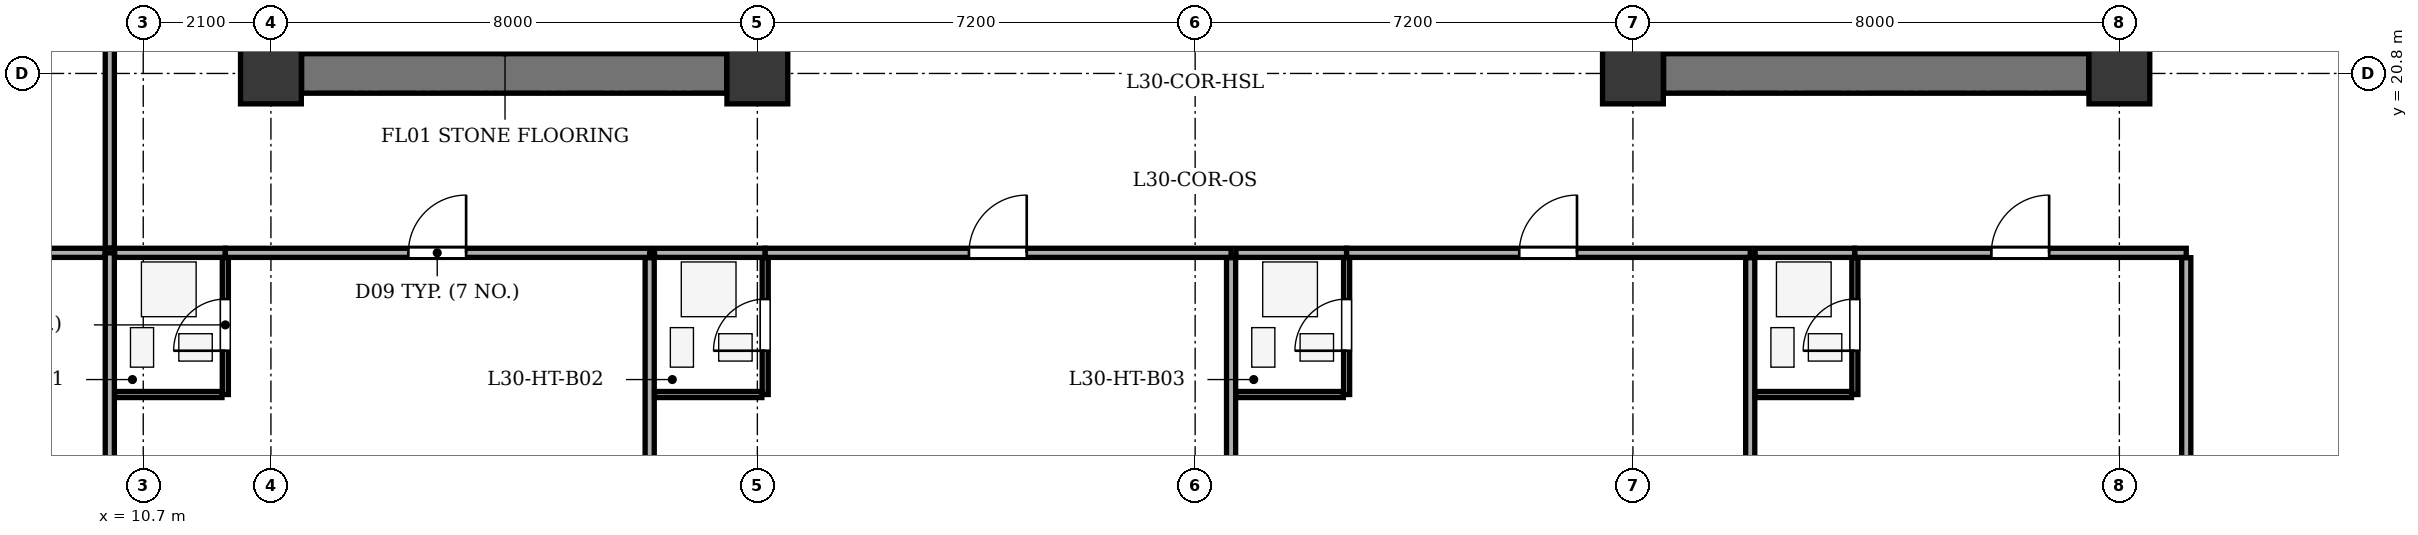
"""IFC4 building model, lengths in metres.
Left out: names, types, materials, properties, quantities, classifications, styles, units other than length and angle.
Written with IfcOpenShell. Run it as: python <this file> out.ifc"""

import sys

from ifc_helpers import new_model, si_unit, direction, frame, frame_2d, origin, origin_2d, place, context, subcontext, project, spatial, rectangle, extrude, element, fill, save


model = new_model("IFC4")
c1 = context("Model", 3, precision=1e-05, world=origin(), true_north=direction((0.0, 1.0)))
c2 = subcontext(c1, "Body", "Model", "MODEL_VIEW")
j1 = project(units=[si_unit("LENGTHUNIT", "METRE"), si_unit("PLANEANGLEUNIT", "RADIAN")], contexts=[c1])
p1 = place(None, origin())
s1 = spatial("IfcSite", under=j1, at=p1, CompositionType="ELEMENT")
p2 = place(p1, origin())
s2 = spatial("IfcBuilding", under=s1, at=p2, CompositionType="ELEMENT")
p3 = place(p2, frame((0.0, 0.0, 123.8)))
s3 = spatial("IfcBuildingStorey", under=s2, at=p3, CompositionType="ELEMENT", Elevation=123.8)
for number, where, z_axis, x_axis in (
    (1, (12.8, 20.8, 0.0), (0.0, 0.0, 1.0), (1.0, 0.0, 0.0)),
    (2, (20.8, 20.8, 0.0), (0.0, 0.0, 1.0), (1.0, 0.0, 0.0)),
    (3, (35.2, 20.8, 0.0), (0.0, 0.0, 1.0), (1.0, 0.0, 0.0)),
    (4, (43.2, 20.8, 0.0), (0.0, 0.0, 1.0), (1.0, 0.0, 0.0)),
):
    element("IfcColumn", number, at=place(p3, frame(where, z_axis=z_axis, x_axis=x_axis)), inside=s3, PredefinedType="COLUMN", context=c2, shape_type="SweptSolid", body=[
        extrude(rectangle(XDim=1.0, YDim=1.0, at=origin_2d()), origin(), (0.0, 0.0, 1.0), 3.5),
    ])
p4 = place(p3, frame((13.305, 20.8, 0.0), z_axis=(0.0, 0.0, 1.0), x_axis=(1.0, 0.0, 0.0)))
e5 = element("IfcWall", 5, at=p4, inside=s3, PredefinedType="SHEAR", context=c2, shape_type="SweptSolid", body=[
    extrude(rectangle(XDim=6.99, YDim=0.65, at=frame_2d((3.495, 0.0))), origin(), (0.0, 0.0, 1.0), 3.2),
])
p5 = place(p3, frame((16.435, 21.135, 0.0), z_axis=(0.0, 0.0, 1.0), x_axis=(0.0, 1.0, 0.0)))
e6 = element("IfcWall", 6, at=p5, inside=s3, PredefinedType="SHEAR", context=c2, shape_type="SweptSolid", body=[
    extrude(rectangle(XDim=12.13, YDim=0.25, at=frame_2d((6.065, 0.0))), origin(), (0.0, 0.0, 1.0), 3.2),
])
p6 = place(p5, frame((0.515, 0.0, 0.0)))
e7 = element("IfcOpeningElement", 7, at=p6, cuts=e6, PredefinedType="OPENING", context=c2, shape_type="SweptSolid", body=[
    extrude(rectangle(XDim=1.2, YDim=2.15, at=frame_2d((0.6, 1.075))), frame((0.0, 0.135, 0.0), z_axis=(0.0, -1.0, 0.0), x_axis=(1.0, 0.0, 0.0)), (0.0, 0.0, 1.0), 0.27),
])
p7 = place(p5, frame((2.665, 0.0, 0.0)))
e8 = element("IfcOpeningElement", 8, at=p7, cuts=e6, PredefinedType="OPENING", context=c2, shape_type="SweptSolid", body=[
    extrude(rectangle(XDim=1.15, YDim=2.15, at=frame_2d((0.575, 1.075))), frame((0.0, 0.135, 0.0), z_axis=(0.0, -1.0, 0.0), x_axis=(1.0, 0.0, 0.0)), (0.0, 0.0, 1.0), 0.27),
])
p8 = place(p3, frame((35.705, 20.8, 0.0), z_axis=(0.0, 0.0, 1.0), x_axis=(1.0, 0.0, 0.0)))
e9 = element("IfcWall", 9, at=p8, inside=s3, PredefinedType="SHEAR", context=c2, shape_type="SweptSolid", body=[
    extrude(rectangle(XDim=6.99, YDim=0.65, at=frame_2d((3.495, 0.0))), origin(), (0.0, 0.0, 1.0), 3.2),
])
p9 = place(p3, frame((39.565, 21.135, 0.0), z_axis=(0.0, 0.0, 1.0), x_axis=(0.0, 1.0, 0.0)))
e10 = element("IfcWall", 10, at=p9, inside=s3, PredefinedType="SHEAR", context=c2, shape_type="SweptSolid", body=[
    extrude(rectangle(XDim=12.13, YDim=0.25, at=frame_2d((6.065, 0.0))), origin(), (0.0, 0.0, 1.0), 3.2),
])
p10 = place(p9, frame((0.515, 0.0, 0.0)))
e11 = element("IfcOpeningElement", 11, at=p10, cuts=e10, PredefinedType="OPENING", context=c2, shape_type="SweptSolid", body=[
    extrude(rectangle(XDim=1.2, YDim=2.15, at=frame_2d((0.6, 1.075))), frame((0.0, 0.135, 0.0), z_axis=(0.0, -1.0, 0.0), x_axis=(1.0, 0.0, 0.0)), (0.0, 0.0, 1.0), 0.27),
])
p11 = place(p9, frame((2.665, 0.0, 0.0)))
e12 = element("IfcOpeningElement", 12, at=p11, cuts=e10, PredefinedType="OPENING", context=c2, shape_type="SweptSolid", body=[
    extrude(rectangle(XDim=1.15, YDim=2.15, at=frame_2d((0.575, 1.075))), frame((0.0, 0.135, 0.0), z_axis=(0.0, -1.0, 0.0), x_axis=(1.0, 0.0, 0.0)), (0.0, 0.0, 1.0), 0.27),
])
p12 = place(p3, frame((10.15, 1.875, 0.0), z_axis=(0.0, 0.0, 1.0), x_axis=(0.0, 1.0, 0.0)))
e13 = element("IfcWall", 13, at=p12, inside=s3, PredefinedType="PARTITIONING", context=c2, shape_type="SweptSolid", body=[
    extrude(rectangle(XDim=15.975, YDim=0.15, at=frame_2d((7.988, 0.0))), origin(), (0.0, 0.0, 1.0), 3.2),
])
p13 = place(p3, frame((10.23, 17.85, 0.0), z_axis=(0.0, 0.0, 1.0), x_axis=(1.0, 0.0, 0.0)))
e14 = element("IfcWall", 14, at=p13, inside=s3, PredefinedType="PARTITIONING", context=c2, shape_type="SweptSolid", body=[
    extrude(rectangle(XDim=1.82, YDim=0.15, at=frame_2d((0.91, 0.0))), origin(), (0.0, 0.0, 1.0), 3.2),
])
p14 = place(p3, frame((12.05, 17.85, 0.0), z_axis=(0.0, 0.0, 1.0), x_axis=(1.0, 0.0, 0.0)))
e15 = element("IfcWall", 15, at=p14, inside=s3, PredefinedType="PARTITIONING", context=c2, shape_type="SweptSolid", body=[
    extrude(rectangle(XDim=6.979, YDim=0.15, at=frame_2d((3.49, 0.0))), origin(), (0.0, 0.0, 1.0), 3.2),
])
p15 = place(p14, frame((3.01, 0.0, 0.0)))
e16 = element("IfcOpeningElement", 16, at=p15, cuts=e15, PredefinedType="OPENING", context=c2, shape_type="SweptSolid", body=[
    extrude(rectangle(XDim=0.95, YDim=2.1, at=frame_2d((0.475, 1.05))), frame((0.0, 0.085, 0.0), z_axis=(0.0, -1.0, 0.0), x_axis=(1.0, 0.0, 0.0)), (0.0, 0.0, 1.0), 0.17),
])
p16 = place(p3, frame((12.05, 15.52, 0.0), z_axis=(0.0, 0.0, 1.0), x_axis=(0.0, 1.0, 0.0)))
e17 = element("IfcWall", 17, at=p16, inside=s3, PredefinedType="PARTITIONING", context=c2, shape_type="SweptSolid", body=[
    extrude(rectangle(XDim=2.25, YDim=0.1, at=frame_2d((1.125, 0.0))), origin(), (0.0, 0.0, 1.0), 3.2),
])
p17 = place(p16, frame((0.72, 0.0, 0.0)))
e18 = element("IfcOpeningElement", 18, at=p17, cuts=e17, PredefinedType="OPENING", context=c2, shape_type="SweptSolid", body=[
    extrude(rectangle(XDim=0.85, YDim=2.05, at=frame_2d((0.425, 1.025))), frame((0.0, 0.06, 0.0), z_axis=(0.0, -1.0, 0.0), x_axis=(1.0, 0.0, 0.0)), (0.0, 0.0, 1.0), 0.12),
])
p18 = place(p3, frame((10.23, 15.52, 0.0), z_axis=(0.0, 0.0, 1.0), x_axis=(1.0, 0.0, 0.0)))
e19 = element("IfcWall", 19, at=p18, inside=s3, PredefinedType="PARTITIONING", context=c2, shape_type="SweptSolid", body=[
    extrude(rectangle(XDim=1.765, YDim=0.1, at=frame_2d((0.883, 0.0))), origin(), (0.0, 0.0, 1.0), 3.2),
])
p19 = place(p3, frame((19.029, 1.875, 0.0), z_axis=(0.0, 0.0, 1.0), x_axis=(0.0, 1.0, 0.0)))
e20 = element("IfcWall", 20, at=p19, inside=s3, PredefinedType="PARTITIONING", context=c2, shape_type="SweptSolid", body=[
    extrude(rectangle(XDim=15.895, YDim=0.15, at=frame_2d((7.948, 0.0))), origin(), (0.0, 0.0, 1.0), 3.2),
])
p20 = place(p3, frame((19.109, 17.85, 0.0), z_axis=(0.0, 0.0, 1.0), x_axis=(1.0, 0.0, 0.0)))
e21 = element("IfcWall", 21, at=p20, inside=s3, PredefinedType="PARTITIONING", context=c2, shape_type="SweptSolid", body=[
    extrude(rectangle(XDim=1.82, YDim=0.15, at=frame_2d((0.91, 0.0))), origin(), (0.0, 0.0, 1.0), 3.2),
])
p21 = place(p3, frame((20.929, 17.85, 0.0), z_axis=(0.0, 0.0, 1.0), x_axis=(1.0, 0.0, 0.0)))
e22 = element("IfcWall", 22, at=p21, inside=s3, PredefinedType="PARTITIONING", context=c2, shape_type="SweptSolid", body=[
    extrude(rectangle(XDim=7.662, YDim=0.15, at=frame_2d((3.831, 0.0))), origin(), (0.0, 0.0, 1.0), 3.2),
])
p22 = place(p21, frame((3.351, 0.0, 0.0)))
e23 = element("IfcOpeningElement", 23, at=p22, cuts=e22, PredefinedType="OPENING", context=c2, shape_type="SweptSolid", body=[
    extrude(rectangle(XDim=0.95, YDim=2.1, at=frame_2d((0.475, 1.05))), frame((0.0, 0.085, 0.0), z_axis=(0.0, -1.0, 0.0), x_axis=(1.0, 0.0, 0.0)), (0.0, 0.0, 1.0), 0.17),
])
p23 = place(p3, frame((20.929, 15.52, 0.0), z_axis=(0.0, 0.0, 1.0), x_axis=(0.0, 1.0, 0.0)))
e24 = element("IfcWall", 24, at=p23, inside=s3, PredefinedType="PARTITIONING", context=c2, shape_type="SweptSolid", body=[
    extrude(rectangle(XDim=2.25, YDim=0.1, at=frame_2d((1.125, 0.0))), origin(), (0.0, 0.0, 1.0), 2.535),
])
p24 = place(p23, frame((0.72, 0.0, 0.0)))
e25 = element("IfcOpeningElement", 25, at=p24, cuts=e24, PredefinedType="OPENING", context=c2, shape_type="SweptSolid", body=[
    extrude(rectangle(XDim=0.85, YDim=2.05, at=frame_2d((0.425, 1.025))), frame((0.0, 0.06, 0.0), z_axis=(0.0, -1.0, 0.0), x_axis=(1.0, 0.0, 0.0)), (0.0, 0.0, 1.0), 0.12),
])
p25 = place(p3, frame((19.109, 15.52, 0.0), z_axis=(0.0, 0.0, 1.0), x_axis=(1.0, 0.0, 0.0)))
e26 = element("IfcWall", 26, at=p25, inside=s3, PredefinedType="PARTITIONING", context=c2, shape_type="SweptSolid", body=[
    extrude(rectangle(XDim=1.765, YDim=0.1, at=frame_2d((0.883, 0.0))), origin(), (0.0, 0.0, 1.0), 3.2),
])
p26 = place(p3, frame((28.591, 1.875, 0.0), z_axis=(0.0, 0.0, 1.0), x_axis=(0.0, 1.0, 0.0)))
e27 = element("IfcWall", 27, at=p26, inside=s3, PredefinedType="PARTITIONING", context=c2, shape_type="SweptSolid", body=[
    extrude(rectangle(XDim=15.895, YDim=0.15, at=frame_2d((7.948, 0.0))), origin(), (0.0, 0.0, 1.0), 3.2),
])
p27 = place(p3, frame((28.671, 17.85, 0.0), z_axis=(0.0, 0.0, 1.0), x_axis=(1.0, 0.0, 0.0)))
e28 = element("IfcWall", 28, at=p27, inside=s3, PredefinedType="PARTITIONING", context=c2, shape_type="SweptSolid", body=[
    extrude(rectangle(XDim=1.82, YDim=0.15, at=frame_2d((0.91, 0.0))), origin(), (0.0, 0.0, 1.0), 3.2),
])
p28 = place(p3, frame((30.491, 17.85, 0.0), z_axis=(0.0, 0.0, 1.0), x_axis=(1.0, 0.0, 0.0)))
e29 = element("IfcWall", 29, at=p28, inside=s3, PredefinedType="PARTITIONING", context=c2, shape_type="SweptSolid", body=[
    extrude(rectangle(XDim=6.638, YDim=0.15, at=frame_2d((3.319, 0.0))), origin(), (0.0, 0.0, 1.0), 3.2),
])
p29 = place(p28, frame((2.839, 0.0, 0.0)))
e30 = element("IfcOpeningElement", 30, at=p29, cuts=e29, PredefinedType="OPENING", context=c2, shape_type="SweptSolid", body=[
    extrude(rectangle(XDim=0.95, YDim=2.1, at=frame_2d((0.475, 1.05))), frame((0.0, 0.085, 0.0), z_axis=(0.0, -1.0, 0.0), x_axis=(1.0, 0.0, 0.0)), (0.0, 0.0, 1.0), 0.17),
])
p30 = place(p3, frame((30.491, 15.52, 0.0), z_axis=(0.0, 0.0, 1.0), x_axis=(0.0, 1.0, 0.0)))
e31 = element("IfcWall", 31, at=p30, inside=s3, PredefinedType="PARTITIONING", context=c2, shape_type="SweptSolid", body=[
    extrude(rectangle(XDim=2.25, YDim=0.1, at=frame_2d((1.125, 0.0))), origin(), (0.0, 0.0, 1.0), 3.2),
])
p31 = place(p30, frame((0.72, 0.0, 0.0)))
e32 = element("IfcOpeningElement", 32, at=p31, cuts=e31, PredefinedType="OPENING", context=c2, shape_type="SweptSolid", body=[
    extrude(rectangle(XDim=0.85, YDim=2.05, at=frame_2d((0.425, 1.025))), frame((0.0, 0.06, 0.0), z_axis=(0.0, -1.0, 0.0), x_axis=(1.0, 0.0, 0.0)), (0.0, 0.0, 1.0), 0.12),
])
p32 = place(p3, frame((28.671, 15.52, 0.0), z_axis=(0.0, 0.0, 1.0), x_axis=(1.0, 0.0, 0.0)))
e33 = element("IfcWall", 33, at=p32, inside=s3, PredefinedType="PARTITIONING", context=c2, shape_type="SweptSolid", body=[
    extrude(rectangle(XDim=1.765, YDim=0.1, at=frame_2d((0.883, 0.0))), origin(), (0.0, 0.0, 1.0), 3.2),
])
p33 = place(p3, frame((37.129, 1.875, 0.0), z_axis=(0.0, 0.0, 1.0), x_axis=(0.0, 1.0, 0.0)))
e34 = element("IfcWall", 34, at=p33, inside=s3, PredefinedType="PARTITIONING", context=c2, shape_type="SweptSolid", body=[
    extrude(rectangle(XDim=15.895, YDim=0.15, at=frame_2d((7.948, 0.0))), origin(), (0.0, 0.0, 1.0), 3.2),
])
p34 = place(p3, frame((37.209, 17.85, 0.0), z_axis=(0.0, 0.0, 1.0), x_axis=(1.0, 0.0, 0.0)))
e35 = element("IfcWall", 35, at=p34, inside=s3, PredefinedType="PARTITIONING", context=c2, shape_type="SweptSolid", body=[
    extrude(rectangle(XDim=1.641, YDim=0.15, at=frame_2d((0.821, 0.0))), origin(), (0.0, 0.0, 1.0), 3.2),
])
p35 = place(p3, frame((38.85, 17.85, 0.0), z_axis=(0.0, 0.0, 1.0), x_axis=(1.0, 0.0, 0.0)))
e36 = element("IfcWall", 36, at=p35, inside=s3, PredefinedType="PARTITIONING", context=c2, shape_type="SweptSolid", body=[
    extrude(rectangle(XDim=5.45, YDim=0.15, at=frame_2d((2.725, 0.0))), origin(), (0.0, 0.0, 1.0), 3.2),
])
p36 = place(p35, frame((2.245, 0.0, 0.0)))
e37 = element("IfcOpeningElement", 37, at=p36, cuts=e36, PredefinedType="OPENING", context=c2, shape_type="SweptSolid", body=[
    extrude(rectangle(XDim=0.95, YDim=2.1, at=frame_2d((0.475, 1.05))), frame((0.0, 0.085, 0.0), z_axis=(0.0, -1.0, 0.0), x_axis=(1.0, 0.0, 0.0)), (0.0, 0.0, 1.0), 0.17),
])
p37 = place(p3, frame((38.85, 15.52, 0.0), z_axis=(0.0, 0.0, 1.0), x_axis=(0.0, 1.0, 0.0)))
e38 = element("IfcWall", 38, at=p37, inside=s3, PredefinedType="PARTITIONING", context=c2, shape_type="SweptSolid", body=[
    extrude(rectangle(XDim=2.25, YDim=0.1, at=frame_2d((1.125, 0.0))), origin(), (0.0, 0.0, 1.0), 3.2),
])
p38 = place(p37, frame((0.72, 0.0, 0.0)))
e39 = element("IfcOpeningElement", 39, at=p38, cuts=e38, PredefinedType="OPENING", context=c2, shape_type="SweptSolid", body=[
    extrude(rectangle(XDim=0.85, YDim=2.05, at=frame_2d((0.425, 1.025))), frame((0.0, 0.06, 0.0), z_axis=(0.0, -1.0, 0.0), x_axis=(1.0, 0.0, 0.0)), (0.0, 0.0, 1.0), 0.12),
])
p39 = place(p3, frame((37.209, 15.52, 0.0), z_axis=(0.0, 0.0, 1.0), x_axis=(1.0, 0.0, 0.0)))
e40 = element("IfcWall", 40, at=p39, inside=s3, PredefinedType="PARTITIONING", context=c2, shape_type="SweptSolid", body=[
    extrude(rectangle(XDim=1.586, YDim=0.1, at=frame_2d((0.793, 0.0))), origin(), (0.0, 0.0, 1.0), 3.2),
])
p40 = place(p3, frame((44.3, 1.875, 0.0), z_axis=(0.0, 0.0, 1.0), x_axis=(0.0, 1.0, 0.0)))
e41 = element("IfcWall", 41, at=p40, inside=s3, PredefinedType="PARTITIONING", context=c2, shape_type="SweptSolid", body=[
    extrude(rectangle(XDim=15.895, YDim=0.15, at=frame_2d((7.948, 0.0))), origin(), (0.0, 0.0, 1.0), 3.2),
])
p41 = place(p3, frame((4.675, 17.85, 0.0), z_axis=(0.0, 0.0, 1.0), x_axis=(1.0, 0.0, 0.0)))
e42 = element("IfcWall", 42, at=p41, inside=s3, PredefinedType="PARTITIONING", context=c2, shape_type="SweptSolid", body=[
    extrude(rectangle(XDim=5.395, YDim=0.15, at=frame_2d((2.698, 0.0))), origin(), (0.0, 0.0, 1.0), 3.2),
])
p42 = place(p3, frame((10.15, 17.93, 0.0), z_axis=(0.0, 0.0, 1.0), x_axis=(0.0, 1.0, 0.0)))
e43 = element("IfcWall", 43, at=p42, inside=s3, PredefinedType="PARTITIONING", context=c2, shape_type="SweptSolid", body=[
    extrude(rectangle(XDim=18.54, YDim=0.15, at=frame_2d((9.27, 0.0))), origin(), (0.0, 0.0, 1.0), 3.2),
])
p43 = place(p42, frame((8.79, 0.0, 0.0)))
e44 = element("IfcOpeningElement", 44, at=p43, cuts=e43, PredefinedType="OPENING", context=c2, shape_type="SweptSolid", body=[
    extrude(rectangle(XDim=0.95, YDim=2.1, at=frame_2d((0.475, 1.05))), frame((0.0, 0.085, 0.0), z_axis=(0.0, -1.0, 0.0), x_axis=(1.0, 0.0, 0.0)), (0.0, 0.0, 1.0), 0.17),
])
p44 = place(p17, origin())
e45 = element("IfcDoor", 45, at=p44, inside=s3, OperationType="SINGLE_SWING_LEFT", PredefinedType="DOOR", context=c2, shape_type="SweptSolid", body=[
    extrude(rectangle(XDim=0.85, YDim=2.05, at=frame_2d((0.425, 1.025))), frame((0.0, 0.025, 0.0), z_axis=(0.0, -1.0, 0.0), x_axis=(1.0, 0.0, 0.0)), (0.0, 0.0, 1.0), 0.05),
])
fill(e18, e45)
p45 = place(p15, origin())
e46 = element("IfcDoor", 46, at=p45, inside=s3, OperationType="SINGLE_SWING_RIGHT", PredefinedType="DOOR", context=c2, shape_type="SweptSolid", body=[
    extrude(rectangle(XDim=0.95, YDim=2.1, at=frame_2d((0.475, 1.05))), frame((0.0, 0.025, 0.0), z_axis=(0.0, -1.0, 0.0), x_axis=(1.0, 0.0, 0.0)), (0.0, 0.0, 1.0), 0.05),
])
fill(e16, e46)
p46 = place(p24, origin())
e47 = element("IfcDoor", 47, at=p46, inside=s3, OperationType="SINGLE_SWING_LEFT", PredefinedType="DOOR", context=c2, shape_type="SweptSolid", body=[
    extrude(rectangle(XDim=0.85, YDim=2.05, at=frame_2d((0.425, 1.025))), frame((0.0, 0.025, 0.0), z_axis=(0.0, -1.0, 0.0), x_axis=(1.0, 0.0, 0.0)), (0.0, 0.0, 1.0), 0.05),
])
fill(e25, e47)
p47 = place(p22, origin())
e48 = element("IfcDoor", 48, at=p47, inside=s3, OperationType="SINGLE_SWING_RIGHT", PredefinedType="DOOR", context=c2, shape_type="SweptSolid", body=[
    extrude(rectangle(XDim=0.95, YDim=2.1, at=frame_2d((0.475, 1.05))), frame((0.0, 0.025, 0.0), z_axis=(0.0, -1.0, 0.0), x_axis=(1.0, 0.0, 0.0)), (0.0, 0.0, 1.0), 0.05),
])
fill(e23, e48)
p48 = place(p31, origin())
e49 = element("IfcDoor", 49, at=p48, inside=s3, OperationType="SINGLE_SWING_LEFT", PredefinedType="DOOR", context=c2, shape_type="SweptSolid", body=[
    extrude(rectangle(XDim=0.85, YDim=2.05, at=frame_2d((0.425, 1.025))), frame((0.0, 0.025, 0.0), z_axis=(0.0, -1.0, 0.0), x_axis=(1.0, 0.0, 0.0)), (0.0, 0.0, 1.0), 0.05),
])
fill(e32, e49)
p49 = place(p29, origin())
e50 = element("IfcDoor", 50, at=p49, inside=s3, OperationType="SINGLE_SWING_RIGHT", PredefinedType="DOOR", context=c2, shape_type="SweptSolid", body=[
    extrude(rectangle(XDim=0.95, YDim=2.1, at=frame_2d((0.475, 1.05))), frame((0.0, 0.025, 0.0), z_axis=(0.0, -1.0, 0.0), x_axis=(1.0, 0.0, 0.0)), (0.0, 0.0, 1.0), 0.05),
])
fill(e30, e50)
p50 = place(p38, origin())
e51 = element("IfcDoor", 51, at=p50, inside=s3, OperationType="SINGLE_SWING_LEFT", PredefinedType="DOOR", context=c2, shape_type="SweptSolid", body=[
    extrude(rectangle(XDim=0.85, YDim=2.05, at=frame_2d((0.425, 1.025))), frame((0.0, 0.025, 0.0), z_axis=(0.0, -1.0, 0.0), x_axis=(1.0, 0.0, 0.0)), (0.0, 0.0, 1.0), 0.05),
])
fill(e39, e51)
p51 = place(p36, origin())
e52 = element("IfcDoor", 52, at=p51, inside=s3, OperationType="SINGLE_SWING_RIGHT", PredefinedType="DOOR", context=c2, shape_type="SweptSolid", body=[
    extrude(rectangle(XDim=0.95, YDim=2.1, at=frame_2d((0.475, 1.05))), frame((0.0, 0.025, 0.0), z_axis=(0.0, -1.0, 0.0), x_axis=(1.0, 0.0, 0.0)), (0.0, 0.0, 1.0), 0.05),
])
fill(e37, e52)
save(model, sys.argv[1])
